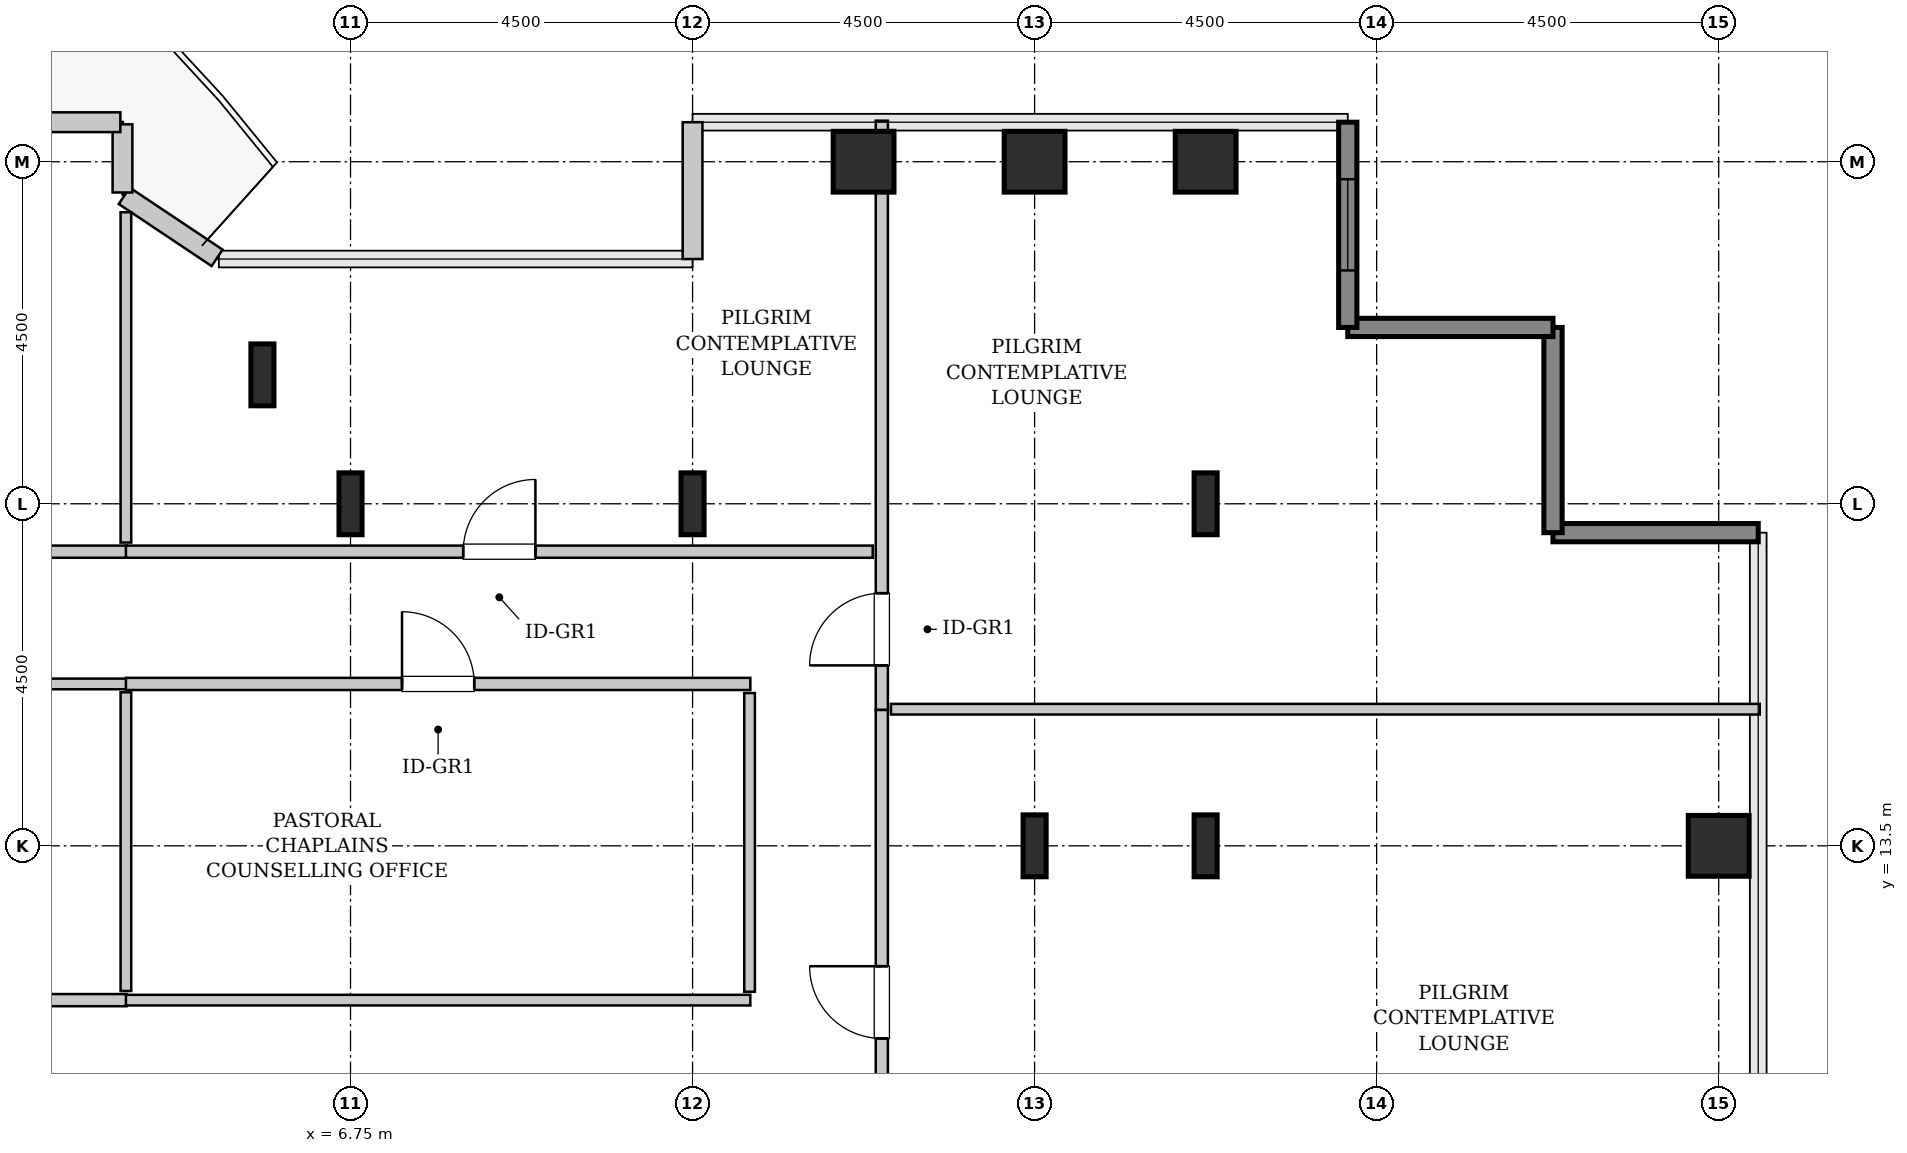
"""IFC4 building model, lengths in metres.
Left out: names, types, materials, properties, quantities, classifications, styles, units other than length and angle.
Written with IfcOpenShell. Run it as: python <this file> out.ifc"""

import sys

from ifc_helpers import new_model, si_unit, direction, frame, frame_2d, origin, origin_2d, place, context, subcontext, project, spatial, rectangle, hollow_rectangle, i_section, extrude, source, transform, mapped, element, fill, save


model = new_model("IFC4")
c1 = context("Model", 3, precision=1e-05, world=origin(), true_north=direction((0.0, 1.0)))
c2 = subcontext(c1, "Body", "Model", "MODEL_VIEW")
j1 = project(units=[si_unit("LENGTHUNIT", "METRE"), si_unit("PLANEANGLEUNIT", "RADIAN")], contexts=[c1])
p1 = place(None, origin())
s1 = spatial("IfcSite", under=j1, at=p1, CompositionType="ELEMENT")
p2 = place(p1, origin())
s2 = spatial("IfcBuilding", under=s1, at=p2, CompositionType="ELEMENT")
p3 = place(p2, frame((0.0, 0.0, 194.4)))
s3 = spatial("IfcBuildingStorey", under=s2, at=p3, CompositionType="ELEMENT", Elevation=194.4)
m1 = source(origin(), c2, "Body", "SweptSolid", [
    extrude(i_section(OverallWidth=0.303, OverallDepth=0.814, WebThickness=0.021, FlangeThickness=0.04, FilletRadius=0.03, at=origin_2d()), origin(), (0.0, 0.0, 1.0), 3.8),
])
for number, where, z_axis, x_axis in (
    (1, (5.591, 19.696, 0.0), (0.0, 0.0, 1.0), (1.0, 0.0, 0.0)),
    (2, (6.75, 18.0, 0.0), (0.0, 0.0, 1.0), (1.0, 0.0, 0.0)),
    (3, (11.25, 18.0, 0.0), (0.0, 0.0, 1.0), (1.0, 0.0, 0.0)),
):
    element("IfcColumn", number, at=place(p3, frame(where, z_axis=z_axis, x_axis=x_axis)), inside=s3, PredefinedType="COLUMN", context=c2, shape_type="MappedRepresentation", body=[
        mapped(m1, transform((0.0, 0.0, 0.0), x_axis=(1.0, 0.0, 0.0), y_axis=(0.0, 1.0, 0.0), z_axis=(0.0, 0.0, 1.0), scale=1.0)),
    ])
m2 = source(origin(), c2, "Body", "SweptSolid", [
    extrude(hollow_rectangle(XDim=0.8, YDim=0.8, WallThickness=0.04, InnerFilletRadius=0.04, OuterFilletRadius=0.08, at=origin_2d()), origin(), (0.0, 0.0, 1.0), 3.8),
])
p4 = place(p3, frame((13.5, 22.5, 0.0), z_axis=(0.0, 0.0, 1.0), x_axis=(1.0, 0.0, 0.0)))
e4 = element("IfcColumn", 4, at=p4, inside=s3, PredefinedType="COLUMN", context=c2, shape_type="MappedRepresentation", body=[
    mapped(m2, transform((0.0, 0.0, 0.0), x_axis=(1.0, 0.0, 0.0), y_axis=(0.0, 1.0, 0.0), z_axis=(0.0, 0.0, 1.0), scale=1.0)),
])
p5 = place(p3, frame((15.75, 13.5, 0.0), z_axis=(0.0, 0.0, 1.0), x_axis=(1.0, 0.0, 0.0)))
e5 = element("IfcColumn", 5, at=p5, inside=s3, PredefinedType="COLUMN", context=c2, shape_type="MappedRepresentation", body=[
    mapped(m1, transform((0.0, 0.0, 0.0), x_axis=(1.0, 0.0, 0.0), y_axis=(0.0, 1.0, 0.0), z_axis=(0.0, 0.0, 1.0), scale=1.0)),
])
p6 = place(p3, frame((15.75, 22.5, 0.0), z_axis=(0.0, 0.0, 1.0), x_axis=(1.0, 0.0, 0.0)))
e6 = element("IfcColumn", 6, at=p6, inside=s3, PredefinedType="COLUMN", context=c2, shape_type="MappedRepresentation", body=[
    mapped(m2, transform((0.0, 0.0, 0.0), x_axis=(1.0, 0.0, 0.0), y_axis=(0.0, 1.0, 0.0), z_axis=(0.0, 0.0, 1.0), scale=1.0)),
])
for number, where, z_axis, x_axis in (
    (7, (18.0, 13.5, 0.0), (0.0, 0.0, 1.0), (1.0, 0.0, 0.0)),
    (8, (18.0, 18.0, 0.0), (0.0, 0.0, 1.0), (1.0, 0.0, 0.0)),
):
    element("IfcColumn", number, at=place(p3, frame(where, z_axis=z_axis, x_axis=x_axis)), inside=s3, PredefinedType="COLUMN", context=c2, shape_type="MappedRepresentation", body=[
        mapped(m1, transform((0.0, 0.0, 0.0), x_axis=(1.0, 0.0, 0.0), y_axis=(0.0, 1.0, 0.0), z_axis=(0.0, 0.0, 1.0), scale=1.0)),
    ])
for number, where, z_axis, x_axis in (
    (9, (18.0, 22.5, 0.0), (0.0, 0.0, 1.0), (1.0, 0.0, 0.0)),
    (10, (24.75, 13.5, 0.0), (0.0, 0.0, 1.0), (1.0, 0.0, 0.0)),
):
    element("IfcColumn", number, at=place(p3, frame(where, z_axis=z_axis, x_axis=x_axis)), inside=s3, PredefinedType="COLUMN", context=c2, shape_type="MappedRepresentation", body=[
        mapped(m2, transform((0.0, 0.0, 0.0), x_axis=(1.0, 0.0, 0.0), y_axis=(0.0, 1.0, 0.0), z_axis=(0.0, 0.0, 1.0), scale=1.0)),
    ])
m3 = source(origin(), c2, "Body", "SweptSolid", [
    extrude(rectangle(XDim=2.7, YDim=0.24, at=frame_2d((1.35, 0.0))), origin(), (0.0, 0.0, 1.0), 3.55),
])
for number, where, z_axis, x_axis in (
    (11, (25.27, 17.62, 0.0), (0.0, 0.0, 1.0), (-1.0, 0.0, 0.0)),
    (12, (22.57, 17.62, 0.0), (0.0, 0.0, 1.0), (0.0, 1.0, 0.0)),
    (13, (22.57, 20.32, 0.0), (0.0, 0.0, 1.0), (-1.0, 0.0, 0.0)),
):
    element("IfcWall", number, at=place(p3, frame(where, z_axis=z_axis, x_axis=x_axis)), inside=s3, PredefinedType="SHEAR", context=c2, shape_type="MappedRepresentation", body=[
        mapped(m3, transform((0.0, 0.0, 0.0), x_axis=(1.0, 0.0, 0.0), y_axis=(0.0, 1.0, 0.0), z_axis=(0.0, 0.0, 1.0), scale=1.0)),
    ])
p7 = place(p3, frame((19.87, 20.32, 0.0), z_axis=(0.0, 0.0, 1.0), x_axis=(0.0, 1.0, 0.0)))
e14 = element("IfcWall", 14, at=p7, inside=s3, PredefinedType="SHEAR", context=c2, shape_type="MappedRepresentation", body=[
    mapped(m3, transform((0.0, 0.0, 0.0), x_axis=(1.0, 0.0, 0.0), y_axis=(0.0, 1.0, 0.0), z_axis=(0.0, 0.0, 1.0), scale=1.0)),
])
p8 = place(p7, frame((0.75, 0.0, 0.85)))
e15 = element("IfcOpeningElement", 15, at=p8, cuts=e14, PredefinedType="OPENING", context=c2, shape_type="SweptSolid", body=[
    extrude(rectangle(XDim=1.2, YDim=1.8, at=frame_2d((0.6, 0.9))), frame((0.0, 0.13, 0.0), z_axis=(0.0, -1.0, 0.0), x_axis=(1.0, 0.0, 0.0)), (0.0, 0.0, 1.0), 0.26),
])
m4 = source(origin(), c2, "Body", "SweptSolid", [
    extrude(rectangle(XDim=1.8, YDim=0.26, at=frame_2d((0.9, 0.0))), origin(), (0.0, 0.0, 1.0), 3.55),
])
p9 = place(p3, frame((11.25, 23.02, 0.0), z_axis=(0.0, 0.0, 1.0), x_axis=(0.0, -1.0, 0.0)))
e16 = element("IfcWall", 16, at=p9, inside=s3, PredefinedType="SOLIDWALL", context=c2, shape_type="MappedRepresentation", body=[
    mapped(m4, transform((0.0, 0.0, 0.0), x_axis=(1.0, 0.0, 0.0), y_axis=(0.0, 1.0, 0.0), z_axis=(0.0, 0.0, 1.0), scale=1.0)),
])
m5 = source(origin(), c2, "Body", "SweptSolid", [
    extrude(rectangle(XDim=1.469, YDim=0.26, at=frame_2d((0.734, 0.0))), origin(), (0.0, 0.0, 1.0), 3.55),
])
p10 = place(p3, frame((4.995, 21.236, 0.0), z_axis=(0.0, 0.0, 1.0), x_axis=(-0.831461760506, 0.555581983884, 0.0)))
e17 = element("IfcWall", 17, at=p10, inside=s3, PredefinedType="SOLIDWALL", context=c2, shape_type="MappedRepresentation", body=[
    mapped(m5, transform((0.0, 0.0, 0.0), x_axis=(1.0, 0.0, 0.0), y_axis=(0.0, 1.0, 0.0), z_axis=(0.0, 0.0, 1.0), scale=1.0)),
])
m6 = source(origin(), c2, "Body", "SweptSolid", [
    extrude(rectangle(XDim=0.897, YDim=0.26, at=frame_2d((0.448, 0.0))), origin(), (0.0, 0.0, 1.0), 3.55),
])
p11 = place(p3, frame((3.75, 22.095, 0.0), z_axis=(0.0, 0.0, 1.0), x_axis=(0.0, 1.0, 0.0)))
e18 = element("IfcWall", 18, at=p11, inside=s3, PredefinedType="SOLIDWALL", context=c2, shape_type="MappedRepresentation", body=[
    mapped(m6, transform((0.0, 0.0, 0.0), x_axis=(1.0, 0.0, 0.0), y_axis=(0.0, 1.0, 0.0), z_axis=(0.0, 0.0, 1.0), scale=1.0)),
])
m7 = source(origin(), c2, "Body", "SweptSolid", [
    extrude(rectangle(XDim=1.37, YDim=0.26, at=frame_2d((0.685, 0.0))), origin(), (0.0, 0.0, 1.0), 3.55),
])
p12 = place(p3, frame((3.722, 23.02, 0.0), z_axis=(0.0, 0.0, 1.0), x_axis=(-1.0, 0.0, 0.0)))
e19 = element("IfcWall", 19, at=p12, inside=s3, PredefinedType="SOLIDWALL", context=c2, shape_type="MappedRepresentation", body=[
    mapped(m7, transform((0.0, 0.0, 0.0), x_axis=(1.0, 0.0, 0.0), y_axis=(0.0, 1.0, 0.0), z_axis=(0.0, 0.0, 1.0), scale=1.0)),
])
m8 = source(origin(), c2, "Body", "SweptSolid", [
    extrude(rectangle(XDim=7.752, YDim=0.16, at=frame_2d((3.876, 0.0))), origin(), (0.0, 0.0, 1.0), 3.535),
])
p13 = place(p3, frame((13.74, 15.288, 0.0), z_axis=(0.0, 0.0, 1.0), x_axis=(0.0, 1.0, 0.0)))
e20 = element("IfcWall", 20, at=p13, inside=s3, PredefinedType="PARTITIONING", context=c2, shape_type="MappedRepresentation", body=[
    mapped(m8, transform((0.0, 0.0, 0.0), x_axis=(1.0, 0.0, 0.0), y_axis=(0.0, 1.0, 0.0), z_axis=(0.0, 0.0, 1.0), scale=1.0)),
])
p14 = place(p13, frame((0.586, 0.0, 0.0)))
e21 = element("IfcOpeningElement", 21, at=p14, cuts=e20, PredefinedType="OPENING", context=c2, shape_type="SweptSolid", body=[
    extrude(rectangle(XDim=0.95, YDim=2.1, at=frame_2d((0.475, 1.05))), frame((0.0, 0.09, 0.0), z_axis=(0.0, -1.0, 0.0), x_axis=(1.0, 0.0, 0.0)), (0.0, 0.0, 1.0), 0.18),
])
m9 = source(origin(), c2, "Body", "SweptSolid", [
    extrude(rectangle(XDim=11.43, YDim=0.14, at=frame_2d((5.715, 0.0))), origin(), (0.0, 0.0, 1.0), 3.535),
])
p15 = place(p3, frame((13.86, 15.298, 0.0), z_axis=(0.0, 0.0, 1.0), x_axis=(1.0, 0.0, 0.0)))
e22 = element("IfcWall", 22, at=p15, inside=s3, PredefinedType="PARTITIONING", context=c2, shape_type="MappedRepresentation", body=[
    mapped(m9, transform((0.0, 0.0, 0.0), x_axis=(1.0, 0.0, 0.0), y_axis=(0.0, 1.0, 0.0), z_axis=(0.0, 0.0, 1.0), scale=1.0)),
])
m10 = source(origin(), c2, "Body", "SweptSolid", [
    extrude(rectangle(XDim=7.693, YDim=0.16, at=frame_2d((3.846, 0.0))), origin(), (0.0, 0.0, 1.0), 3.535),
])
p16 = place(p3, frame((13.74, 7.595, 0.0), z_axis=(0.0, 0.0, 1.0), x_axis=(0.0, 1.0, 0.0)))
e23 = element("IfcWall", 23, at=p16, inside=s3, PredefinedType="PARTITIONING", context=c2, shape_type="MappedRepresentation", body=[
    mapped(m10, transform((0.0, 0.0, 0.0), x_axis=(1.0, 0.0, 0.0), y_axis=(0.0, 1.0, 0.0), z_axis=(0.0, 0.0, 1.0), scale=1.0)),
])
p17 = place(p16, frame((3.371, 0.0, 0.0)))
e24 = element("IfcOpeningElement", 24, at=p17, cuts=e23, PredefinedType="OPENING", context=c2, shape_type="SweptSolid", body=[
    extrude(rectangle(XDim=0.95, YDim=2.1, at=frame_2d((0.475, 1.05))), frame((0.0, 0.09, 0.0), z_axis=(0.0, -1.0, 0.0), x_axis=(1.0, 0.0, 0.0)), (0.0, 0.0, 1.0), 0.18),
])
m11 = source(origin(), c2, "Body", "SweptSolid", [
    extrude(rectangle(XDim=15.815, YDim=0.16, at=frame_2d((7.907, 0.0))), origin(), (0.0, 0.0, 1.0), 3.535),
])
p18 = place(p3, frame((-12.01, 11.47, 0.0), z_axis=(0.0, 0.0, 1.0), x_axis=(1.0, 0.0, 0.0)))
e25 = element("IfcWall", 25, at=p18, inside=s3, PredefinedType="PARTITIONING", context=c2, shape_type="MappedRepresentation", body=[
    mapped(m11, transform((0.0, 0.0, 0.0), x_axis=(1.0, 0.0, 0.0), y_axis=(0.0, 1.0, 0.0), z_axis=(0.0, 0.0, 1.0), scale=1.0)),
])
p19 = place(p18, frame((7.433, 0.0, 0.0)))
e26 = element("IfcOpeningElement", 26, at=p19, cuts=e25, PredefinedType="OPENING", context=c2, shape_type="SweptSolid", body=[
    extrude(rectangle(XDim=0.95, YDim=2.1, at=frame_2d((0.475, 1.05))), frame((0.0, 0.09, 0.0), z_axis=(0.0, -1.0, 0.0), x_axis=(1.0, 0.0, 0.0)), (0.0, 0.0, 1.0), 0.18),
])
m12 = source(origin(), c2, "Body", "SweptSolid", [
    extrude(rectangle(XDim=15.815, YDim=0.14, at=frame_2d((7.907, 0.0))), origin(), (0.0, 0.0, 1.0), 3.535),
])
p20 = place(p3, frame((-12.01, 15.63, 0.0), z_axis=(0.0, 0.0, 1.0), x_axis=(1.0, 0.0, 0.0)))
e27 = element("IfcWall", 27, at=p20, inside=s3, PredefinedType="PARTITIONING", context=c2, shape_type="MappedRepresentation", body=[
    mapped(m12, transform((0.0, 0.0, 0.0), x_axis=(1.0, 0.0, 0.0), y_axis=(0.0, 1.0, 0.0), z_axis=(0.0, 0.0, 1.0), scale=1.0)),
])
m13 = source(origin(), c2, "Body", "SweptSolid", [
    extrude(rectangle(XDim=3.93, YDim=0.14, at=frame_2d((1.965, 0.0))), origin(), (0.0, 0.0, 1.0), 3.535),
])
p21 = place(p3, frame((3.795, 11.59, 0.0), z_axis=(0.0, 0.0, 1.0), x_axis=(0.0, 1.0, 0.0)))
e28 = element("IfcWall", 28, at=p21, inside=s3, PredefinedType="PARTITIONING", context=c2, shape_type="MappedRepresentation", body=[
    mapped(m13, transform((0.0, 0.0, 0.0), x_axis=(1.0, 0.0, 0.0), y_axis=(0.0, 1.0, 0.0), z_axis=(0.0, 0.0, 1.0), scale=1.0)),
])
m14 = source(origin(), c2, "Body", "SweptSolid", [
    extrude(rectangle(XDim=11.245, YDim=0.16, at=frame_2d((5.623, 0.0))), origin(), (0.0, 0.0, 1.0), 3.535),
])
p22 = place(p3, frame((-7.44, 17.37, 0.0), z_axis=(0.0, 0.0, 1.0), x_axis=(1.0, 0.0, 0.0)))
e29 = element("IfcWall", 29, at=p22, inside=s3, PredefinedType="PARTITIONING", context=c2, shape_type="MappedRepresentation", body=[
    mapped(m14, transform((0.0, 0.0, 0.0), x_axis=(1.0, 0.0, 0.0), y_axis=(0.0, 1.0, 0.0), z_axis=(0.0, 0.0, 1.0), scale=1.0)),
])
p23 = place(p22, frame((5.926, 0.0, 0.0)))
e30 = element("IfcOpeningElement", 30, at=p23, cuts=e29, PredefinedType="OPENING", context=c2, shape_type="SweptSolid", body=[
    extrude(rectangle(XDim=0.95, YDim=2.1, at=frame_2d((0.475, 1.05))), frame((0.0, 0.09, 0.0), z_axis=(0.0, -1.0, 0.0), x_axis=(1.0, 0.0, 0.0)), (0.0, 0.0, 1.0), 0.18),
])
m15 = source(origin(), c2, "Body", "SweptSolid", [
    extrude(rectangle(XDim=4.345, YDim=0.14, at=frame_2d((2.173, 0.0))), origin(), (0.0, 0.0, 1.0), 3.535),
])
p24 = place(p3, frame((3.795, 17.49, 0.0), z_axis=(0.0, 0.0, 1.0), x_axis=(0.0, 1.0, 0.0)))
e31 = element("IfcWall", 31, at=p24, inside=s3, PredefinedType="PARTITIONING", context=c2, shape_type="MappedRepresentation", body=[
    mapped(m15, transform((0.0, 0.0, 0.0), x_axis=(1.0, 0.0, 0.0), y_axis=(0.0, 1.0, 0.0), z_axis=(0.0, 0.0, 1.0), scale=1.0)),
])
m16 = source(origin(), c2, "Body", "SweptSolid", [
    extrude(rectangle(XDim=9.825, YDim=0.16, at=frame_2d((4.913, 0.0))), origin(), (0.0, 0.0, 1.0), 3.535),
])
p25 = place(p3, frame((3.795, 17.37, 0.0), z_axis=(0.0, 0.0, 1.0), x_axis=(1.0, 0.0, 0.0)))
e32 = element("IfcWall", 32, at=p25, inside=s3, PredefinedType="PARTITIONING", context=c2, shape_type="MappedRepresentation", body=[
    mapped(m16, transform((0.0, 0.0, 0.0), x_axis=(1.0, 0.0, 0.0), y_axis=(0.0, 1.0, 0.0), z_axis=(0.0, 0.0, 1.0), scale=1.0)),
])
p26 = place(p25, frame((4.438, 0.0, 0.0)))
e33 = element("IfcOpeningElement", 33, at=p26, cuts=e32, PredefinedType="OPENING", context=c2, shape_type="SweptSolid", body=[
    extrude(rectangle(XDim=0.95, YDim=2.1, at=frame_2d((0.475, 1.05))), frame((0.0, 0.09, 0.0), z_axis=(0.0, -1.0, 0.0), x_axis=(1.0, 0.0, 0.0)), (0.0, 0.0, 1.0), 0.18),
])
m17 = source(origin(), c2, "Body", "SweptSolid", [
    extrude(rectangle(XDim=8.215, YDim=0.16, at=frame_2d((4.107, 0.0))), origin(), (0.0, 0.0, 1.0), 3.535),
])
p27 = place(p3, frame((3.795, 15.63, 0.0), z_axis=(0.0, 0.0, 1.0), x_axis=(1.0, 0.0, 0.0)))
e34 = element("IfcWall", 34, at=p27, inside=s3, PredefinedType="PARTITIONING", context=c2, shape_type="MappedRepresentation", body=[
    mapped(m17, transform((0.0, 0.0, 0.0), x_axis=(1.0, 0.0, 0.0), y_axis=(0.0, 1.0, 0.0), z_axis=(0.0, 0.0, 1.0), scale=1.0)),
])
p28 = place(p27, frame((3.633, 0.0, 0.0)))
e35 = element("IfcOpeningElement", 35, at=p28, cuts=e34, PredefinedType="OPENING", context=c2, shape_type="SweptSolid", body=[
    extrude(rectangle(XDim=0.95, YDim=2.1, at=frame_2d((0.475, 1.05))), frame((0.0, 0.09, 0.0), z_axis=(0.0, -1.0, 0.0), x_axis=(1.0, 0.0, 0.0)), (0.0, 0.0, 1.0), 0.18),
])
m18 = source(origin(), c2, "Body", "SweptSolid", [
    extrude(rectangle(XDim=8.215, YDim=0.14, at=frame_2d((4.107, 0.0))), origin(), (0.0, 0.0, 1.0), 3.535),
])
p29 = place(p3, frame((3.795, 11.47, 0.0), z_axis=(0.0, 0.0, 1.0), x_axis=(1.0, 0.0, 0.0)))
e36 = element("IfcWall", 36, at=p29, inside=s3, PredefinedType="PARTITIONING", context=c2, shape_type="MappedRepresentation", body=[
    mapped(m18, transform((0.0, 0.0, 0.0), x_axis=(1.0, 0.0, 0.0), y_axis=(0.0, 1.0, 0.0), z_axis=(0.0, 0.0, 1.0), scale=1.0)),
])
p30 = place(p3, frame((12.0, 11.58, 0.0), z_axis=(0.0, 0.0, 1.0), x_axis=(0.0, 1.0, 0.0)))
e37 = element("IfcWall", 37, at=p30, inside=s3, PredefinedType="PARTITIONING", context=c2, shape_type="MappedRepresentation", body=[
    mapped(m13, transform((0.0, 0.0, 0.0), x_axis=(1.0, 0.0, 0.0), y_axis=(0.0, 1.0, 0.0), z_axis=(0.0, 0.0, 1.0), scale=1.0)),
])
m19 = source(origin(), c2, "Body", "SweptSolid", [
    extrude(rectangle(XDim=1.2, YDim=1.8, at=frame_2d((0.6, 0.9))), frame((0.0, 0.03, 0.0), z_axis=(0.0, -1.0, 0.0), x_axis=(1.0, 0.0, 0.0)), (0.0, 0.0, 1.0), 0.06),
])
p31 = place(p8, origin())
e38 = element("IfcWindow", 38, at=p31, inside=s3, PartitioningType="SINGLE_PANEL", PredefinedType="WINDOW", context=c2, shape_type="MappedRepresentation", body=[
    mapped(m19, transform((0.0, 0.0, 0.0), x_axis=(1.0, 0.0, 0.0), y_axis=(0.0, 1.0, 0.0), z_axis=(0.0, 0.0, 1.0), scale=1.0)),
])
fill(e15, e38)
m20 = source(origin(), c2, "Body", "SweptSolid", [
    extrude(rectangle(XDim=0.95, YDim=2.1, at=frame_2d((0.475, 1.05))), frame((0.0, 0.025, 0.0), z_axis=(0.0, -1.0, 0.0), x_axis=(1.0, 0.0, 0.0)), (0.0, 0.0, 1.0), 0.05),
])
p32 = place(p14, origin())
e39 = element("IfcDoor", 39, at=p32, inside=s3, OperationType="SINGLE_SWING_LEFT", PredefinedType="DOOR", context=c2, shape_type="MappedRepresentation", body=[
    mapped(m20, transform((0.0, 0.0, 0.0), x_axis=(1.0, 0.0, 0.0), y_axis=(0.0, 1.0, 0.0), z_axis=(0.0, 0.0, 1.0), scale=1.0)),
])
fill(e21, e39)
p33 = place(p17, origin())
e40 = element("IfcDoor", 40, at=p33, inside=s3, OperationType="SINGLE_SWING_RIGHT", PredefinedType="DOOR", context=c2, shape_type="MappedRepresentation", body=[
    mapped(m20, transform((0.0, 0.0, 0.0), x_axis=(1.0, 0.0, 0.0), y_axis=(0.0, 1.0, 0.0), z_axis=(0.0, 0.0, 1.0), scale=1.0)),
])
fill(e24, e40)
p34 = place(p26, origin())
e41 = element("IfcDoor", 41, at=p34, inside=s3, OperationType="SINGLE_SWING_RIGHT", PredefinedType="DOOR", context=c2, shape_type="MappedRepresentation", body=[
    mapped(m20, transform((0.0, 0.0, 0.0), x_axis=(1.0, 0.0, 0.0), y_axis=(0.0, 1.0, 0.0), z_axis=(0.0, 0.0, 1.0), scale=1.0)),
])
fill(e33, e41)
p35 = place(p28, origin())
e42 = element("IfcDoor", 42, at=p35, inside=s3, OperationType="SINGLE_SWING_LEFT", PredefinedType="DOOR", context=c2, shape_type="MappedRepresentation", body=[
    mapped(m20, transform((0.0, 0.0, 0.0), x_axis=(1.0, 0.0, 0.0), y_axis=(0.0, 1.0, 0.0), z_axis=(0.0, 0.0, 1.0), scale=1.0)),
])
fill(e35, e42)
save(model, sys.argv[1])
